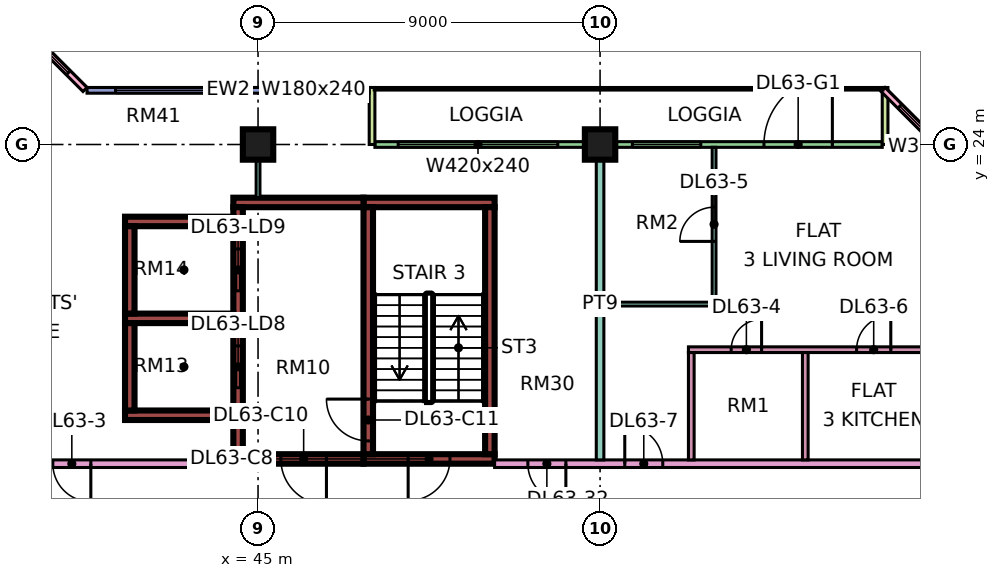
"""IFC4 building model, lengths in metres.
Left out: names, types, materials, properties, quantities, classifications, styles, units other than length and angle.
Written with IfcOpenShell. Run it as: python <this file> out.ifc"""

import sys

from ifc_helpers import new_model, si_unit, direction, frame, frame_2d, origin, origin_2d, place, context, subcontext, project, spatial, rectangle, extrude, element, fill, save


model = new_model("IFC4")
c1 = context("Model", 3, precision=1e-05, world=origin(), true_north=direction((0.0, 1.0)))
c2 = subcontext(c1, "Body", "Model", "MODEL_VIEW")
j1 = project(units=[si_unit("LENGTHUNIT", "METRE"), si_unit("PLANEANGLEUNIT", "RADIAN")], contexts=[c1])
p1 = place(None, origin())
s1 = spatial("IfcSite", under=j1, at=p1, CompositionType="ELEMENT")
p2 = place(p1, origin())
s2 = spatial("IfcBuilding", under=s1, at=p2, CompositionType="ELEMENT")
p3 = place(p2, frame((0.0, 0.0, 273.4)))
s3 = spatial("IfcBuildingStorey", under=s2, at=p3, CompositionType="ELEMENT", Elevation=273.4)
for number, where, z_axis, x_axis in (
    (1, (45.0, 24.0, 0.0), (0.0, 0.0, 1.0), (1.0, 0.0, 0.0)),
    (2, (54.0, 24.0, 0.0), (0.0, 0.0, 1.0), (1.0, 0.0, 0.0)),
):
    element("IfcColumn", number, at=place(p3, frame(where, z_axis=z_axis, x_axis=x_axis)), inside=s3, PredefinedType="COLUMN", context=c2, shape_type="SweptSolid", body=[
        extrude(rectangle(XDim=0.8, YDim=0.8, at=origin_2d()), origin(), (0.0, 0.0, 1.0), 3.75),
    ])
p4 = place(p3, frame((47.775, 15.725, 0.0), z_axis=(0.0, 0.0, 1.0), x_axis=(1.0, 0.0, 0.0)))
e3 = element("IfcWall", 3, at=p4, inside=s3, PredefinedType="SHEAR", context=c2, shape_type="SweptSolid", body=[
    extrude(rectangle(XDim=3.45, YDim=0.25, at=frame_2d((1.725, 0.0))), origin(), (0.0, 0.0, 1.0), 3.75),
])
p5 = place(p4, frame((1.175, 0.0, 0.0)))
e4 = element("IfcOpeningElement", 4, at=p5, cuts=e3, PredefinedType="OPENING", context=c2, shape_type="SweptSolid", body=[
    extrude(rectangle(XDim=1.1, YDim=2.2, at=frame_2d((0.55, 1.1))), frame((0.0, 0.135, 0.0), z_axis=(0.0, -1.0, 0.0), x_axis=(1.0, 0.0, 0.0)), (0.0, 0.0, 1.0), 0.27),
])
p6 = place(p3, frame((47.775, 22.475, 0.0), z_axis=(0.0, 0.0, 1.0), x_axis=(1.0, 0.0, 0.0)))
e5 = element("IfcWall", 5, at=p6, inside=s3, PredefinedType="SHEAR", context=c2, shape_type="SweptSolid", body=[
    extrude(rectangle(XDim=3.45, YDim=0.25, at=frame_2d((1.725, 0.0))), origin(), (0.0, 0.0, 1.0), 3.75),
])
p7 = place(p3, frame((47.9, 15.85, 0.0), z_axis=(0.0, 0.0, 1.0), x_axis=(0.0, 1.0, 0.0)))
e6 = element("IfcWall", 6, at=p7, inside=s3, PredefinedType="SHEAR", context=c2, shape_type="SweptSolid", body=[
    extrude(rectangle(XDim=6.5, YDim=0.25, at=frame_2d((3.25, 0.0))), origin(), (0.0, 0.0, 1.0), 3.75),
])
p8 = place(p7, frame((0.35, 0.0, 0.0)))
e7 = element("IfcOpeningElement", 7, at=p8, cuts=e6, PredefinedType="OPENING", context=c2, shape_type="SweptSolid", body=[
    extrude(rectangle(XDim=1.1, YDim=2.2, at=frame_2d((0.55, 1.1))), frame((0.0, 0.135, 0.0), z_axis=(0.0, -1.0, 0.0), x_axis=(1.0, 0.0, 0.0)), (0.0, 0.0, 1.0), 0.27),
])
p9 = place(p3, frame((51.1, 15.85, 0.0), z_axis=(0.0, 0.0, 1.0), x_axis=(0.0, 1.0, 0.0)))
e8 = element("IfcWall", 8, at=p9, inside=s3, PredefinedType="SHEAR", context=c2, shape_type="SweptSolid", body=[
    extrude(rectangle(XDim=6.5, YDim=0.25, at=frame_2d((3.25, 0.0))), origin(), (0.0, 0.0, 1.0), 3.75),
])
p10 = place(p3, frame((44.35, 15.725, 0.0), z_axis=(0.0, 0.0, 1.0), x_axis=(1.0, 0.0, 0.0)))
e9 = element("IfcWall", 9, at=p10, inside=s3, PredefinedType="SHEAR", context=c2, shape_type="SweptSolid", body=[
    extrude(rectangle(XDim=3.425, YDim=0.25, at=frame_2d((1.712, 0.0))), origin(), (0.0, 0.0, 1.0), 3.75),
])
p11 = place(p10, frame((1.25, 0.0, 0.0)))
e10 = element("IfcOpeningElement", 10, at=p11, cuts=e9, PredefinedType="OPENING", context=c2, shape_type="SweptSolid", body=[
    extrude(rectangle(XDim=1.2, YDim=2.2, at=frame_2d((0.6, 1.1))), frame((0.0, 0.135, 0.0), z_axis=(0.0, -1.0, 0.0), x_axis=(1.0, 0.0, 0.0)), (0.0, 0.0, 1.0), 0.27),
])
p12 = place(p3, frame((44.35, 22.475, 0.0), z_axis=(0.0, 0.0, 1.0), x_axis=(1.0, 0.0, 0.0)))
e11 = element("IfcWall", 11, at=p12, inside=s3, PredefinedType="SHEAR", context=c2, shape_type="SweptSolid", body=[
    extrude(rectangle(XDim=3.425, YDim=0.25, at=frame_2d((1.712, 0.0))), origin(), (0.0, 0.0, 1.0), 3.75),
])
p13 = place(p3, frame((44.475, 15.85, 0.0), z_axis=(0.0, 0.0, 1.0), x_axis=(0.0, 1.0, 0.0)))
e12 = element("IfcWall", 12, at=p13, inside=s3, PredefinedType="SHEAR", context=c2, shape_type="SweptSolid", body=[
    extrude(rectangle(XDim=6.5, YDim=0.25, at=frame_2d((3.25, 0.0))), origin(), (0.0, 0.0, 1.0), 3.75),
])
p14 = place(p13, frame((1.75, 0.0, 0.0)))
e13 = element("IfcOpeningElement", 13, at=p14, cuts=e12, PredefinedType="OPENING", context=c2, shape_type="SweptSolid", body=[
    extrude(rectangle(XDim=1.1, YDim=2.2, at=frame_2d((0.55, 1.1))), frame((0.0, 0.135, 0.0), z_axis=(0.0, -1.0, 0.0), x_axis=(1.0, 0.0, 0.0)), (0.0, 0.0, 1.0), 0.27),
])
p15 = place(p13, frame((4.3, 0.0, 0.0)))
e14 = element("IfcOpeningElement", 14, at=p15, cuts=e12, PredefinedType="OPENING", context=c2, shape_type="SweptSolid", body=[
    extrude(rectangle(XDim=1.1, YDim=2.2, at=frame_2d((0.55, 1.1))), frame((0.0, 0.135, 0.0), z_axis=(0.0, -1.0, 0.0), x_axis=(1.0, 0.0, 0.0)), (0.0, 0.0, 1.0), 0.27),
])
for number, where, z_axis, x_axis in (
    (15, (41.5, 16.875, 0.0), (0.0, 0.0, 1.0), (1.0, 0.0, 0.0)),
    (16, (41.5, 19.425, 0.0), (0.0, 0.0, 1.0), (1.0, 0.0, 0.0)),
    (17, (41.5, 21.975, 0.0), (0.0, 0.0, 1.0), (1.0, 0.0, 0.0)),
):
    element("IfcWall", number, at=place(p3, frame(where, z_axis=z_axis, x_axis=x_axis)), inside=s3, PredefinedType="SHEAR", context=c2, shape_type="SweptSolid", body=[
        extrude(rectangle(XDim=2.85, YDim=0.25, at=frame_2d((1.425, 0.0))), origin(), (0.0, 0.0, 1.0), 3.75),
    ])
for number, where, z_axis, x_axis in (
    (18, (41.625, 17.0, 0.0), (0.0, 0.0, 1.0), (0.0, 1.0, 0.0)),
    (19, (41.625, 19.55, 0.0), (0.0, 0.0, 1.0), (0.0, 1.0, 0.0)),
):
    element("IfcWall", number, at=place(p3, frame(where, z_axis=z_axis, x_axis=x_axis)), inside=s3, PredefinedType="SHEAR", context=c2, shape_type="SweptSolid", body=[
        extrude(rectangle(XDim=2.3, YDim=0.25, at=frame_2d((1.15, 0.0))), origin(), (0.0, 0.0, 1.0), 3.75),
    ])
p16 = place(p3, frame((61.425, 24.0, 0.0), z_axis=(0.0, 0.0, 1.0), x_axis=(-1.0, 0.0, 0.0)))
e20 = element("IfcWall", 20, at=p16, inside=s3, PredefinedType="SOLIDWALL", context=c2, shape_type="SweptSolid", body=[
    extrude(rectangle(XDim=13.35, YDim=0.15, at=frame_2d((6.675, 0.0))), origin(), (0.0, 0.0, 1.0), 3.35),
])
p17 = place(p16, frame((1.312, 0.0, 0.0)))
e21 = element("IfcOpeningElement", 21, at=p17, cuts=e20, PredefinedType="OPENING", context=c2, shape_type="SweptSolid", body=[
    extrude(rectangle(XDim=1.8, YDim=2.4, at=frame_2d((0.9, 1.2))), frame((0.0, 0.085, 0.0), z_axis=(0.0, -1.0, 0.0), x_axis=(1.0, 0.0, 0.0)), (0.0, 0.0, 1.0), 0.17),
])
p18 = place(p16, frame((4.775, 0.0, 0.45)))
e22 = element("IfcOpeningElement", 22, at=p18, cuts=e20, PredefinedType="OPENING", context=c2, shape_type="SweptSolid", body=[
    extrude(rectangle(XDim=1.8, YDim=2.4, at=frame_2d((0.9, 1.2))), frame((0.0, 0.085, 0.0), z_axis=(0.0, -1.0, 0.0), x_axis=(1.0, 0.0, 0.0)), (0.0, 0.0, 1.0), 0.17),
])
p19 = place(p16, frame((8.538, 0.0, 0.45)))
e23 = element("IfcOpeningElement", 23, at=p19, cuts=e20, PredefinedType="OPENING", context=c2, shape_type="SweptSolid", body=[
    extrude(rectangle(XDim=4.2, YDim=2.4, at=frame_2d((2.1, 1.2))), frame((0.0, 0.085, 0.0), z_axis=(0.0, -1.0, 0.0), x_axis=(1.0, 0.0, 0.0)), (0.0, 0.0, 1.0), 0.17),
])
for number, where, z_axis, x_axis in (
    (24, (61.5, 25.5, 0.0), (0.0, 0.0, 1.0), (0.0, -1.0, 0.0)),
    (25, (48.0, 25.5, 0.0), (0.0, 0.0, 1.0), (0.0, -1.0, 0.0)),
):
    element("IfcWall", number, at=place(p3, frame(where, z_axis=z_axis, x_axis=x_axis)), inside=s3, PredefinedType="SOLIDWALL", context=c2, shape_type="SweptSolid", body=[
        extrude(rectangle(XDim=1.5, YDim=0.15, at=frame_2d((0.75, 0.0))), origin(), (0.0, 0.0, 1.0), 3.35),
    ])
p20 = place(p3, frame((47.925, 25.425, 0.0), z_axis=(0.0, 0.0, 1.0), x_axis=(-1.0, 0.0, 0.0)))
e26 = element("IfcWall", 26, at=p20, inside=s3, PredefinedType="SOLIDWALL", context=c2, shape_type="SweptSolid", body=[
    extrude(rectangle(XDim=7.425, YDim=0.15, at=frame_2d((3.712, 0.0))), origin(), (0.0, 0.0, 1.0), 3.35),
])
p21 = place(p20, frame((0.562, 0.0, 0.45)))
e27 = element("IfcOpeningElement", 27, at=p21, cuts=e26, PredefinedType="OPENING", context=c2, shape_type="SweptSolid", body=[
    extrude(rectangle(XDim=1.8, YDim=2.4, at=frame_2d((0.9, 1.2))), frame((0.0, 0.085, 0.0), z_axis=(0.0, -1.0, 0.0), x_axis=(1.0, 0.0, 0.0)), (0.0, 0.0, 1.0), 0.17),
])
p22 = place(p20, frame((3.675, 0.0, 0.45)))
e28 = element("IfcOpeningElement", 28, at=p22, cuts=e26, PredefinedType="OPENING", context=c2, shape_type="SweptSolid", body=[
    extrude(rectangle(XDim=3.0, YDim=2.4, at=frame_2d((1.5, 1.2))), frame((0.0, 0.085, 0.0), z_axis=(0.0, -1.0, 0.0), x_axis=(1.0, 0.0, 0.0)), (0.0, 0.0, 1.0), 0.17),
])
p23 = place(p3, frame((40.447, 25.447, 0.0), z_axis=(0.0, 0.0, 1.0), x_axis=(-0.707106781187, 0.707106781187, 0.0)))
e29 = element("IfcWall", 29, at=p23, inside=s3, PredefinedType="SOLIDWALL", context=c2, shape_type="SweptSolid", body=[
    extrude(rectangle(XDim=4.243, YDim=0.15, at=frame_2d((2.121, 0.0))), origin(), (0.0, 0.0, 1.0), 3.35),
])
p24 = place(p23, frame((0.621, 0.0, 0.45)))
e30 = element("IfcOpeningElement", 30, at=p24, cuts=e29, PredefinedType="OPENING", context=c2, shape_type="SweptSolid", body=[
    extrude(rectangle(XDim=3.0, YDim=2.4, at=frame_2d((1.5, 1.2))), frame((0.0, 0.085, 0.0), z_axis=(0.0, -1.0, 0.0), x_axis=(1.0, 0.0, 0.0)), (0.0, 0.0, 1.0), 0.17),
])
p25 = place(p3, frame((64.447, 22.447, 0.0), z_axis=(0.0, 0.0, 1.0), x_axis=(-0.707106781187, 0.707106781187, 0.0)))
e31 = element("IfcWall", 31, at=p25, inside=s3, PredefinedType="SOLIDWALL", context=c2, shape_type="SweptSolid", body=[
    extrude(rectangle(XDim=4.243, YDim=0.15, at=frame_2d((2.121, 0.0))), origin(), (0.0, 0.0, 1.0), 3.35),
])
p26 = place(p25, frame((0.621, 0.0, 0.45)))
e32 = element("IfcOpeningElement", 32, at=p26, cuts=e31, PredefinedType="OPENING", context=c2, shape_type="SweptSolid", body=[
    extrude(rectangle(XDim=3.0, YDim=2.4, at=frame_2d((1.5, 1.2))), frame((0.0, 0.085, 0.0), z_axis=(0.0, -1.0, 0.0), x_axis=(1.0, 0.0, 0.0)), (0.0, 0.0, 1.0), 0.17),
])
p27 = place(p3, frame((34.0, 15.6, 0.0), z_axis=(0.0, 0.0, 1.0), x_axis=(1.0, 0.0, 0.0)))
e33 = element("IfcWall", 33, at=p27, inside=s3, PredefinedType="PARTITIONING", context=c2, shape_type="SweptSolid", body=[
    extrude(rectangle(XDim=10.35, YDim=0.2, at=frame_2d((5.175, 0.0))), origin(), (0.0, 0.0, 1.0), 3.35),
])
p28 = place(p27, frame((5.6, 0.0, 0.0)))
e34 = element("IfcOpeningElement", 34, at=p28, cuts=e33, PredefinedType="OPENING", context=c2, shape_type="SweptSolid", body=[
    extrude(rectangle(XDim=1.0, YDim=2.1, at=frame_2d((0.5, 1.05))), frame((0.0, 0.11, 0.0), z_axis=(0.0, -1.0, 0.0), x_axis=(1.0, 0.0, 0.0)), (0.0, 0.0, 1.0), 0.22),
])
p29 = place(p27, frame((0.45, 0.0, 0.0)))
e35 = element("IfcOpeningElement", 35, at=p29, cuts=e33, PredefinedType="OPENING", context=c2, shape_type="SweptSolid", body=[
    extrude(rectangle(XDim=1.2, YDim=2.1, at=frame_2d((0.6, 1.05))), frame((0.0, 0.11, 0.0), z_axis=(0.0, -1.0, 0.0), x_axis=(1.0, 0.0, 0.0)), (0.0, 0.0, 1.0), 0.22),
])
p30 = place(p3, frame((45.0, 22.6, 0.0), z_axis=(0.0, 0.0, 1.0), x_axis=(0.0, 1.0, 0.0)))
e36 = element("IfcWall", 36, at=p30, inside=s3, PredefinedType="PARTITIONING", context=c2, shape_type="SweptSolid", body=[
    extrude(rectangle(XDim=1.4, YDim=0.1, at=frame_2d((0.7, 0.0))), origin(), (0.0, 0.0, 1.0), 3.35),
])
p31 = place(p3, frame((51.225, 15.6, 0.0), z_axis=(0.0, 0.0, 1.0), x_axis=(1.0, 0.0, 0.0)))
e37 = element("IfcWall", 37, at=p31, inside=s3, PredefinedType="PARTITIONING", context=c2, shape_type="SweptSolid", body=[
    extrude(rectangle(XDim=13.125, YDim=0.2, at=frame_2d((6.562, 0.0))), origin(), (0.0, 0.0, 1.0), 3.35),
])
p32 = place(p31, frame((3.425, 0.0, 0.0)))
e38 = element("IfcOpeningElement", 38, at=p32, cuts=e37, PredefinedType="OPENING", context=c2, shape_type="SweptSolid", body=[
    extrude(rectangle(XDim=1.0, YDim=2.1, at=frame_2d((0.5, 1.05))), frame((0.0, 0.11, 0.0), z_axis=(0.0, -1.0, 0.0), x_axis=(1.0, 0.0, 0.0)), (0.0, 0.0, 1.0), 0.22),
])
p33 = place(p31, frame((0.875, 0.0, 0.0)))
e39 = element("IfcOpeningElement", 39, at=p33, cuts=e37, PredefinedType="OPENING", context=c2, shape_type="SweptSolid", body=[
    extrude(rectangle(XDim=1.0, YDim=2.1, at=frame_2d((0.5, 1.05))), frame((0.0, 0.11, 0.0), z_axis=(0.0, -1.0, 0.0), x_axis=(1.0, 0.0, 0.0)), (0.0, 0.0, 1.0), 0.22),
])
p34 = place(p3, frame((54.0, 15.7, 0.0), z_axis=(0.0, 0.0, 1.0), x_axis=(0.0, 1.0, 0.0)))
e40 = element("IfcWall", 40, at=p34, inside=s3, PredefinedType="PARTITIONING", context=c2, shape_type="SweptSolid", body=[
    extrude(rectangle(XDim=8.226, YDim=0.2, at=frame_2d((4.113, 0.0))), origin(), (0.0, 0.0, 1.0), 3.35),
])
p35 = place(p3, frame((54.1, 19.8, 0.0), z_axis=(0.0, 0.0, 1.0), x_axis=(1.0, 0.0, 0.0)))
e41 = element("IfcWall", 41, at=p35, inside=s3, PredefinedType="PARTITIONING", context=c2, shape_type="SweptSolid", body=[
    extrude(rectangle(XDim=2.85, YDim=0.1, at=frame_2d((1.425, 0.0))), origin(), (0.0, 0.0, 1.0), 3.35),
])
p36 = place(p3, frame((56.325, 18.6, 0.0), z_axis=(0.0, 0.0, 1.0), x_axis=(1.0, 0.0, 0.0)))
e42 = element("IfcWall", 42, at=p36, inside=s3, PredefinedType="PARTITIONING", context=c2, shape_type="SweptSolid", body=[
    extrude(rectangle(XDim=8.025, YDim=0.15, at=frame_2d((4.013, 0.0))), origin(), (0.0, 0.0, 1.0), 3.35),
])
p37 = place(p36, frame((1.125, 0.0, 0.0)))
e43 = element("IfcOpeningElement", 43, at=p37, cuts=e42, PredefinedType="OPENING", context=c2, shape_type="SweptSolid", body=[
    extrude(rectangle(XDim=0.8, YDim=2.1, at=frame_2d((0.4, 1.05))), frame((0.0, 0.085, 0.0), z_axis=(0.0, -1.0, 0.0), x_axis=(1.0, 0.0, 0.0)), (0.0, 0.0, 1.0), 0.17),
])
p38 = place(p36, frame((4.425, 0.0, 0.0)))
e44 = element("IfcOpeningElement", 44, at=p38, cuts=e42, PredefinedType="OPENING", context=c2, shape_type="SweptSolid", body=[
    extrude(rectangle(XDim=0.9, YDim=2.1, at=frame_2d((0.45, 1.05))), frame((0.0, 0.085, 0.0), z_axis=(0.0, -1.0, 0.0), x_axis=(1.0, 0.0, 0.0)), (0.0, 0.0, 1.0), 0.17),
])
p39 = place(p3, frame((56.4, 15.7, 0.0), z_axis=(0.0, 0.0, 1.0), x_axis=(0.0, 1.0, 0.0)))
e45 = element("IfcWall", 45, at=p39, inside=s3, PredefinedType="PARTITIONING", context=c2, shape_type="SweptSolid", body=[
    extrude(rectangle(XDim=2.825, YDim=0.15, at=frame_2d((1.413, 0.0))), origin(), (0.0, 0.0, 1.0), 3.35),
])
p40 = place(p3, frame((57.0, 19.75, 0.0), z_axis=(0.0, 0.0, 1.0), x_axis=(0.0, 1.0, 0.0)))
e46 = element("IfcWall", 46, at=p40, inside=s3, PredefinedType="PARTITIONING", context=c2, shape_type="SweptSolid", body=[
    extrude(rectangle(XDim=4.176, YDim=0.1, at=frame_2d((2.088, 0.0))), origin(), (0.0, 0.0, 1.0), 3.35),
])
p41 = place(p40, frame((1.7, 0.0, 0.0)))
e47 = element("IfcOpeningElement", 47, at=p41, cuts=e46, PredefinedType="OPENING", context=c2, shape_type="SweptSolid", body=[
    extrude(rectangle(XDim=0.9, YDim=2.1, at=frame_2d((0.45, 1.05))), frame((0.0, 0.06, 0.0), z_axis=(0.0, -1.0, 0.0), x_axis=(1.0, 0.0, 0.0)), (0.0, 0.0, 1.0), 0.12),
])
p42 = place(p3, frame((59.4, 15.7, 0.0), z_axis=(0.0, 0.0, 1.0), x_axis=(0.0, 1.0, 0.0)))
e48 = element("IfcWall", 48, at=p42, inside=s3, PredefinedType="PARTITIONING", context=c2, shape_type="SweptSolid", body=[
    extrude(rectangle(XDim=2.825, YDim=0.15, at=frame_2d((1.413, 0.0))), origin(), (0.0, 0.0, 1.0), 3.35),
])
p43 = place(p17, frame((1.8, 0.0, 0.0), z_axis=(0.0, 0.0, 1.0), x_axis=(-1.0, 0.0, 0.0)))
e49 = element("IfcDoor", 49, at=p43, inside=s3, OperationType="DOUBLE_DOOR_SINGLE_SWING", PredefinedType="DOOR", context=c2, shape_type="SweptSolid", body=[
    extrude(rectangle(XDim=1.8, YDim=2.4, at=frame_2d((0.9, 1.2))), frame((0.0, 0.025, 0.0), z_axis=(0.0, -1.0, 0.0), x_axis=(1.0, 0.0, 0.0)), (0.0, 0.0, 1.0), 0.05),
])
fill(e21, e49)
p44 = place(p18, origin())
e50 = element("IfcWindow", 50, at=p44, inside=s3, PartitioningType="SINGLE_PANEL", PredefinedType="WINDOW", context=c2, shape_type="SweptSolid", body=[
    extrude(rectangle(XDim=1.8, YDim=2.4, at=frame_2d((0.9, 1.2))), frame((0.0, 0.03, 0.0), z_axis=(0.0, -1.0, 0.0), x_axis=(1.0, 0.0, 0.0)), (0.0, 0.0, 1.0), 0.06),
])
fill(e22, e50)
p45 = place(p19, origin())
e51 = element("IfcWindow", 51, at=p45, inside=s3, PartitioningType="SINGLE_PANEL", PredefinedType="WINDOW", context=c2, shape_type="SweptSolid", body=[
    extrude(rectangle(XDim=4.2, YDim=2.4, at=frame_2d((2.1, 1.2))), frame((0.0, 0.03, 0.0), z_axis=(0.0, -1.0, 0.0), x_axis=(1.0, 0.0, 0.0)), (0.0, 0.0, 1.0), 0.06),
])
fill(e23, e51)
p46 = place(p21, origin())
e52 = element("IfcWindow", 52, at=p46, inside=s3, PartitioningType="SINGLE_PANEL", PredefinedType="WINDOW", context=c2, shape_type="SweptSolid", body=[
    extrude(rectangle(XDim=1.8, YDim=2.4, at=frame_2d((0.9, 1.2))), frame((0.0, 0.03, 0.0), z_axis=(0.0, -1.0, 0.0), x_axis=(1.0, 0.0, 0.0)), (0.0, 0.0, 1.0), 0.06),
])
fill(e27, e52)
p47 = place(p22, origin())
e53 = element("IfcWindow", 53, at=p47, inside=s3, PartitioningType="SINGLE_PANEL", PredefinedType="WINDOW", context=c2, shape_type="SweptSolid", body=[
    extrude(rectangle(XDim=3.0, YDim=2.4, at=frame_2d((1.5, 1.2))), frame((0.0, 0.03, 0.0), z_axis=(0.0, -1.0, 0.0), x_axis=(1.0, 0.0, 0.0)), (0.0, 0.0, 1.0), 0.06),
])
fill(e28, e53)
p48 = place(p24, origin())
e54 = element("IfcWindow", 54, at=p48, inside=s3, PartitioningType="SINGLE_PANEL", PredefinedType="WINDOW", context=c2, shape_type="SweptSolid", body=[
    extrude(rectangle(XDim=3.0, YDim=2.4, at=frame_2d((1.5, 1.2))), frame((0.0, 0.03, 0.0), z_axis=(0.0, -1.0, 0.0), x_axis=(1.0, 0.0, 0.0)), (0.0, 0.0, 1.0), 0.06),
])
fill(e30, e54)
p49 = place(p26, origin())
e55 = element("IfcWindow", 55, at=p49, inside=s3, PartitioningType="SINGLE_PANEL", PredefinedType="WINDOW", context=c2, shape_type="SweptSolid", body=[
    extrude(rectangle(XDim=3.0, YDim=2.4, at=frame_2d((1.5, 1.2))), frame((0.0, 0.03, 0.0), z_axis=(0.0, -1.0, 0.0), x_axis=(1.0, 0.0, 0.0)), (0.0, 0.0, 1.0), 0.06),
])
fill(e32, e55)
p50 = place(p5, frame((1.1, 0.0, 0.0), z_axis=(0.0, 0.0, 1.0), x_axis=(-1.0, 0.0, 0.0)))
e56 = element("IfcDoor", 56, at=p50, inside=s3, OperationType="SINGLE_SWING_LEFT", PredefinedType="DOOR", context=c2, shape_type="SweptSolid", body=[
    extrude(rectangle(XDim=1.1, YDim=2.2, at=frame_2d((0.55, 1.1))), frame((0.0, 0.025, 0.0), z_axis=(0.0, -1.0, 0.0), x_axis=(1.0, 0.0, 0.0)), (0.0, 0.0, 1.0), 0.05),
])
fill(e4, e56)
p51 = place(p11, origin())
e57 = element("IfcDoor", 57, at=p51, inside=s3, OperationType="SINGLE_SWING_RIGHT", PredefinedType="DOOR", context=c2, shape_type="SweptSolid", body=[
    extrude(rectangle(XDim=1.2, YDim=2.2, at=frame_2d((0.6, 1.1))), frame((0.0, 0.025, 0.0), z_axis=(0.0, -1.0, 0.0), x_axis=(1.0, 0.0, 0.0)), (0.0, 0.0, 1.0), 0.05),
])
fill(e10, e57)
p52 = place(p8, frame((1.1, 0.0, 0.0), z_axis=(0.0, 0.0, 1.0), x_axis=(-1.0, 0.0, 0.0)))
e58 = element("IfcDoor", 58, at=p52, inside=s3, OperationType="SINGLE_SWING_RIGHT", PredefinedType="DOOR", context=c2, shape_type="SweptSolid", body=[
    extrude(rectangle(XDim=1.1, YDim=2.2, at=frame_2d((0.55, 1.1))), frame((0.0, 0.025, 0.0), z_axis=(0.0, -1.0, 0.0), x_axis=(1.0, 0.0, 0.0)), (0.0, 0.0, 1.0), 0.05),
])
fill(e7, e58)
p53 = place(p14, origin())
e59 = element("IfcDoor", 59, at=p53, inside=s3, OperationType="DOUBLE_DOOR_SLIDING", PredefinedType="DOOR", context=c2, shape_type="SweptSolid", body=[
    extrude(rectangle(XDim=1.1, YDim=2.2, at=frame_2d((0.55, 1.1))), frame((0.0, 0.025, 0.0), z_axis=(0.0, -1.0, 0.0), x_axis=(1.0, 0.0, 0.0)), (0.0, 0.0, 1.0), 0.05),
])
fill(e13, e59)
p54 = place(p15, origin())
e60 = element("IfcDoor", 60, at=p54, inside=s3, OperationType="DOUBLE_DOOR_SLIDING", PredefinedType="DOOR", context=c2, shape_type="SweptSolid", body=[
    extrude(rectangle(XDim=1.1, YDim=2.2, at=frame_2d((0.55, 1.1))), frame((0.0, 0.025, 0.0), z_axis=(0.0, -1.0, 0.0), x_axis=(1.0, 0.0, 0.0)), (0.0, 0.0, 1.0), 0.05),
])
fill(e14, e60)
p55 = place(p28, origin())
e61 = element("IfcDoor", 61, at=p55, inside=s3, OperationType="SINGLE_SWING_RIGHT", PredefinedType="DOOR", context=c2, shape_type="SweptSolid", body=[
    extrude(rectangle(XDim=1.0, YDim=2.1, at=frame_2d((0.5, 1.05))), frame((0.0, 0.025, 0.0), z_axis=(0.0, -1.0, 0.0), x_axis=(1.0, 0.0, 0.0)), (0.0, 0.0, 1.0), 0.05),
])
fill(e34, e61)
p56 = place(p37, frame((0.8, 0.0, 0.0), z_axis=(0.0, 0.0, 1.0), x_axis=(-1.0, 0.0, 0.0)))
e62 = element("IfcDoor", 62, at=p56, inside=s3, OperationType="SINGLE_SWING_RIGHT", PredefinedType="DOOR", context=c2, shape_type="SweptSolid", body=[
    extrude(rectangle(XDim=0.8, YDim=2.1, at=frame_2d((0.4, 1.05))), frame((0.0, 0.025, 0.0), z_axis=(0.0, -1.0, 0.0), x_axis=(1.0, 0.0, 0.0)), (0.0, 0.0, 1.0), 0.05),
])
fill(e43, e62)
p57 = place(p41, origin())
e63 = element("IfcDoor", 63, at=p57, inside=s3, OperationType="SINGLE_SWING_LEFT", PredefinedType="DOOR", context=c2, shape_type="SweptSolid", body=[
    extrude(rectangle(XDim=0.9, YDim=2.1, at=frame_2d((0.45, 1.05))), frame((0.0, 0.025, 0.0), z_axis=(0.0, -1.0, 0.0), x_axis=(1.0, 0.0, 0.0)), (0.0, 0.0, 1.0), 0.05),
])
fill(e47, e63)
p58 = place(p38, frame((0.9, 0.0, 0.0), z_axis=(0.0, 0.0, 1.0), x_axis=(-1.0, 0.0, 0.0)))
e64 = element("IfcDoor", 64, at=p58, inside=s3, OperationType="SINGLE_SWING_RIGHT", PredefinedType="DOOR", context=c2, shape_type="SweptSolid", body=[
    extrude(rectangle(XDim=0.9, YDim=2.1, at=frame_2d((0.45, 1.05))), frame((0.0, 0.025, 0.0), z_axis=(0.0, -1.0, 0.0), x_axis=(1.0, 0.0, 0.0)), (0.0, 0.0, 1.0), 0.05),
])
fill(e44, e64)
p59 = place(p32, origin())
e65 = element("IfcDoor", 65, at=p59, inside=s3, OperationType="SINGLE_SWING_LEFT", PredefinedType="DOOR", context=c2, shape_type="SweptSolid", body=[
    extrude(rectangle(XDim=1.0, YDim=2.1, at=frame_2d((0.5, 1.05))), frame((0.0, 0.025, 0.0), z_axis=(0.0, -1.0, 0.0), x_axis=(1.0, 0.0, 0.0)), (0.0, 0.0, 1.0), 0.05),
])
fill(e38, e65)
p60 = place(p33, origin())
e66 = element("IfcDoor", 66, at=p60, inside=s3, OperationType="SINGLE_SWING_RIGHT", PredefinedType="DOOR", context=c2, shape_type="SweptSolid", body=[
    extrude(rectangle(XDim=1.0, YDim=2.1, at=frame_2d((0.5, 1.05))), frame((0.0, 0.025, 0.0), z_axis=(0.0, -1.0, 0.0), x_axis=(1.0, 0.0, 0.0)), (0.0, 0.0, 1.0), 0.05),
])
fill(e39, e66)
save(model, sys.argv[1])
